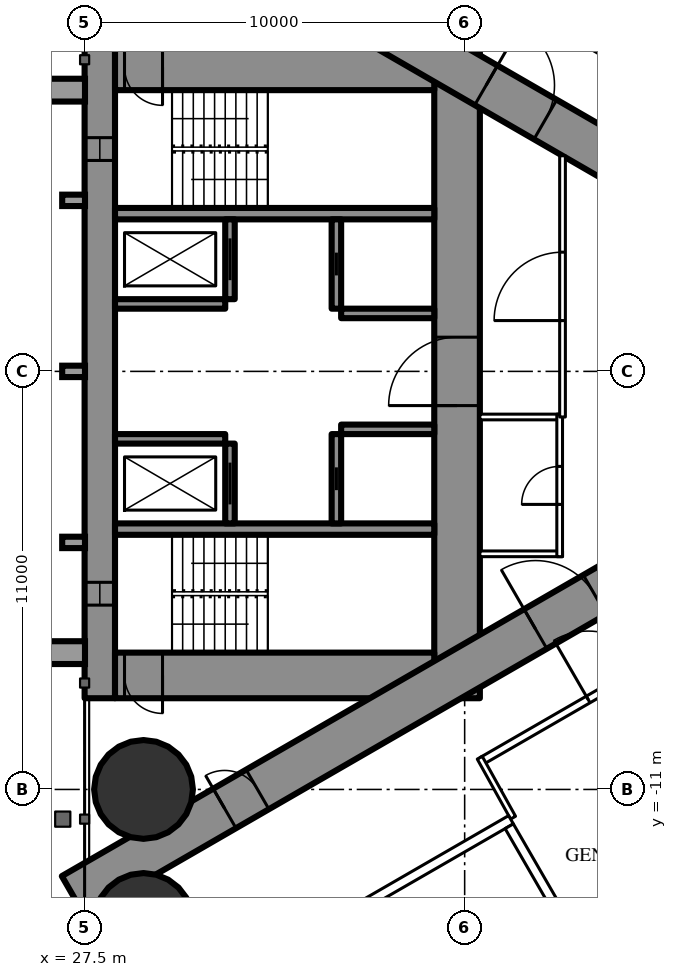
"""IFC4 building model, lengths in metres.
Left out: names, types, materials, properties, quantities, classifications, styles, units other than length and angle.
Written with IfcOpenShell. Run it as: python <this file> out.ifc"""

import sys

from ifc_helpers import new_model, si_unit, direction, frame, frame_2d, origin, origin_2d, place, context, subcontext, project, spatial, rectangle, hollow_circle, extrude, element, fill, save


model = new_model("IFC4")
c1 = context("Model", 3, precision=1e-05, world=origin(), true_north=direction((0.0, 1.0)))
c2 = subcontext(c1, "Body", "Model", "MODEL_VIEW")
j1 = project(units=[si_unit("LENGTHUNIT", "METRE"), si_unit("PLANEANGLEUNIT", "RADIAN")], contexts=[c1])
p1 = place(None, origin())
s1 = spatial("IfcSite", under=j1, at=p1, CompositionType="ELEMENT")
p2 = place(p1, origin())
s2 = spatial("IfcBuilding", under=s1, at=p2, CompositionType="ELEMENT")
p3 = place(p2, frame((0.0, 0.0, 143.1)))
s3 = spatial("IfcBuildingStorey", under=s2, at=p3, CompositionType="ELEMENT", Elevation=143.1)
for number, where, z_axis, x_axis in (
    (1, (29.05, -11.0, 0.0), (0.0, 0.0, 1.0), (1.0, 0.0, 0.0)),
    (2, (29.05, -14.5, 0.0), (0.0, 0.0, 1.0), (1.0, 0.0, 0.0)),
):
    element("IfcColumn", number, at=place(p3, frame(where, z_axis=z_axis, x_axis=x_axis)), inside=s3, PredefinedType="COLUMN", context=c2, shape_type="SweptSolid", body=[
        extrude(hollow_circle(Radius=1.3, WallThickness=0.1, at=origin_2d()), origin(), (0.0, 0.0, 1.0), 3.6),
    ])
p4 = place(p3, frame((27.9, -8.6, 0.0), z_axis=(0.0, 0.0, 1.0), x_axis=(0.0, 1.0, 0.0)))
e3 = element("IfcWall", 3, at=p4, inside=s3, PredefinedType="SHEAR", context=c2, shape_type="SweptSolid", body=[
    extrude(rectangle(XDim=17.2, YDim=0.8, at=frame_2d((8.6, 0.0))), origin(), (0.0, 0.0, 1.0), 3.6),
])
p5 = place(p4, frame((2.45, 0.0, 0.6)))
e4 = element("IfcOpeningElement", 4, at=p5, cuts=e3, PredefinedType="OPENING", context=c2, shape_type="SweptSolid", body=[
    extrude(rectangle(XDim=0.6, YDim=2.1, at=frame_2d((0.3, 1.05))), frame((0.0, 0.41, 0.0), z_axis=(0.0, -1.0, 0.0), x_axis=(1.0, 0.0, 0.0)), (0.0, 0.0, 1.0), 0.82),
])
p6 = place(p4, frame((14.15, 0.0, 0.6)))
e5 = element("IfcOpeningElement", 5, at=p6, cuts=e3, PredefinedType="OPENING", context=c2, shape_type="SweptSolid", body=[
    extrude(rectangle(XDim=0.6, YDim=2.1, at=frame_2d((0.3, 1.05))), frame((0.0, 0.41, 0.0), z_axis=(0.0, -1.0, 0.0), x_axis=(1.0, 0.0, 0.0)), (0.0, 0.0, 1.0), 0.82),
])
p7 = place(p3, frame((37.3, -8.6, 0.0), z_axis=(0.0, 0.0, 1.0), x_axis=(0.0, 1.0, 0.0)))
e6 = element("IfcWall", 6, at=p7, inside=s3, PredefinedType="SHEAR", context=c2, shape_type="SweptSolid", body=[
    extrude(rectangle(XDim=17.2, YDim=1.2, at=frame_2d((8.6, 0.0))), origin(), (0.0, 0.0, 1.0), 3.6),
])
p8 = place(p7, frame((7.7, 0.0, 0.0)))
e7 = element("IfcOpeningElement", 7, at=p8, cuts=e6, PredefinedType="OPENING", context=c2, shape_type="SweptSolid", body=[
    extrude(rectangle(XDim=1.8, YDim=2.2, at=frame_2d((0.9, 1.1))), frame((0.0, 0.61, 0.0), z_axis=(0.0, -1.0, 0.0), x_axis=(1.0, 0.0, 0.0)), (0.0, 0.0, 1.0), 1.22),
])
p9 = place(p3, frame((28.3, -8.0, 0.0), z_axis=(0.0, 0.0, 1.0), x_axis=(1.0, 0.0, 0.0)))
e8 = element("IfcWall", 8, at=p9, inside=s3, PredefinedType="SHEAR", context=c2, shape_type="SweptSolid", body=[
    extrude(rectangle(XDim=8.4, YDim=1.2, at=frame_2d((4.2, 0.0))), origin(), (0.0, 0.0, 1.0), 3.6),
])
p10 = place(p9, frame((0.25, 0.0, 0.0)))
e9 = element("IfcOpeningElement", 9, at=p10, cuts=e8, PredefinedType="OPENING", context=c2, shape_type="SweptSolid", body=[
    extrude(rectangle(XDim=1.0, YDim=2.2, at=frame_2d((0.5, 1.1))), frame((0.0, 0.61, 0.0), z_axis=(0.0, -1.0, 0.0), x_axis=(1.0, 0.0, 0.0)), (0.0, 0.0, 1.0), 1.22),
])
p11 = place(p3, frame((28.3, 8.0, 0.0), z_axis=(0.0, 0.0, 1.0), x_axis=(1.0, 0.0, 0.0)))
e10 = element("IfcWall", 10, at=p11, inside=s3, PredefinedType="SHEAR", context=c2, shape_type="SweptSolid", body=[
    extrude(rectangle(XDim=8.4, YDim=1.2, at=frame_2d((4.2, 0.0))), origin(), (0.0, 0.0, 1.0), 3.6),
])
p12 = place(p11, frame((0.25, 0.0, 0.0)))
e11 = element("IfcOpeningElement", 11, at=p12, cuts=e10, PredefinedType="OPENING", context=c2, shape_type="SweptSolid", body=[
    extrude(rectangle(XDim=1.0, YDim=2.2, at=frame_2d((0.5, 1.1))), frame((0.0, 0.61, 0.0), z_axis=(0.0, -1.0, 0.0), x_axis=(1.0, 0.0, 0.0)), (0.0, 0.0, 1.0), 1.22),
])
for number, where, z_axis, x_axis in (
    (12, (28.3, -4.15, 0.0), (0.0, 0.0, 1.0), (1.0, 0.0, 0.0)),
    (13, (28.3, 4.15, 0.0), (0.0, 0.0, 1.0), (1.0, 0.0, 0.0)),
):
    element("IfcWall", number, at=place(p3, frame(where, z_axis=z_axis, x_axis=x_axis)), inside=s3, PredefinedType="SHEAR", context=c2, shape_type="SweptSolid", body=[
        extrude(rectangle(XDim=8.4, YDim=0.3, at=frame_2d((4.2, 0.0))), origin(), (0.0, 0.0, 1.0), 3.6),
    ])
p13 = place(p3, frame((31.325, -4.0, 0.0), z_axis=(0.0, 0.0, 1.0), x_axis=(0.0, 1.0, 0.0)))
e14 = element("IfcWall", 14, at=p13, inside=s3, PredefinedType="SHEAR", context=c2, shape_type="SweptSolid", body=[
    extrude(rectangle(XDim=2.1, YDim=0.25, at=frame_2d((1.05, 0.0))), origin(), (0.0, 0.0, 1.0), 3.6),
])
p14 = place(p13, frame((0.5, 0.0, 0.0)))
e15 = element("IfcOpeningElement", 15, at=p14, cuts=e14, PredefinedType="OPENING", context=c2, shape_type="SweptSolid", body=[
    extrude(rectangle(XDim=1.1, YDim=2.2, at=frame_2d((0.55, 1.1))), frame((0.0, 0.135, 0.0), z_axis=(0.0, -1.0, 0.0), x_axis=(1.0, 0.0, 0.0)), (0.0, 0.0, 1.0), 0.27),
])
p15 = place(p3, frame((34.125, -4.0, 0.0), z_axis=(0.0, 0.0, 1.0), x_axis=(0.0, 1.0, 0.0)))
e16 = element("IfcWall", 16, at=p15, inside=s3, PredefinedType="SHEAR", context=c2, shape_type="SweptSolid", body=[
    extrude(rectangle(XDim=2.35, YDim=0.25, at=frame_2d((1.175, 0.0))), origin(), (0.0, 0.0, 1.0), 3.6),
])
p16 = place(p15, frame((0.875, 0.0, 0.0)))
e17 = element("IfcOpeningElement", 17, at=p16, cuts=e16, PredefinedType="OPENING", context=c2, shape_type="SweptSolid", body=[
    extrude(rectangle(XDim=0.6, YDim=2.0, at=frame_2d((0.3, 1.0))), frame((0.0, 0.135, 0.0), z_axis=(0.0, -1.0, 0.0), x_axis=(1.0, 0.0, 0.0)), (0.0, 0.0, 1.0), 0.27),
])
p17 = place(p3, frame((28.3, -1.775, 0.0), z_axis=(0.0, 0.0, 1.0), x_axis=(1.0, 0.0, 0.0)))
e18 = element("IfcWall", 18, at=p17, inside=s3, PredefinedType="SHEAR", context=c2, shape_type="SweptSolid", body=[
    extrude(rectangle(XDim=2.9, YDim=0.25, at=frame_2d((1.45, 0.0))), origin(), (0.0, 0.0, 1.0), 3.6),
])
p18 = place(p3, frame((34.25, -1.525, 0.0), z_axis=(0.0, 0.0, 1.0), x_axis=(1.0, 0.0, 0.0)))
e19 = element("IfcWall", 19, at=p18, inside=s3, PredefinedType="SHEAR", context=c2, shape_type="SweptSolid", body=[
    extrude(rectangle(XDim=2.45, YDim=0.25, at=frame_2d((1.225, 0.0))), origin(), (0.0, 0.0, 1.0), 3.6),
])
p19 = place(p3, frame((31.325, 1.9, 0.0), z_axis=(0.0, 0.0, 1.0), x_axis=(0.0, 1.0, 0.0)))
e20 = element("IfcWall", 20, at=p19, inside=s3, PredefinedType="SHEAR", context=c2, shape_type="SweptSolid", body=[
    extrude(rectangle(XDim=2.1, YDim=0.25, at=frame_2d((1.05, 0.0))), origin(), (0.0, 0.0, 1.0), 3.6),
])
p20 = place(p19, frame((0.5, 0.0, 0.0)))
e21 = element("IfcOpeningElement", 21, at=p20, cuts=e20, PredefinedType="OPENING", context=c2, shape_type="SweptSolid", body=[
    extrude(rectangle(XDim=1.1, YDim=2.2, at=frame_2d((0.55, 1.1))), frame((0.0, 0.135, 0.0), z_axis=(0.0, -1.0, 0.0), x_axis=(1.0, 0.0, 0.0)), (0.0, 0.0, 1.0), 0.27),
])
p21 = place(p3, frame((34.125, 1.65, 0.0), z_axis=(0.0, 0.0, 1.0), x_axis=(0.0, 1.0, 0.0)))
e22 = element("IfcWall", 22, at=p21, inside=s3, PredefinedType="SHEAR", context=c2, shape_type="SweptSolid", body=[
    extrude(rectangle(XDim=2.35, YDim=0.25, at=frame_2d((1.175, 0.0))), origin(), (0.0, 0.0, 1.0), 3.6),
])
p22 = place(p21, frame((0.875, 0.0, 0.0)))
e23 = element("IfcOpeningElement", 23, at=p22, cuts=e22, PredefinedType="OPENING", context=c2, shape_type="SweptSolid", body=[
    extrude(rectangle(XDim=0.6, YDim=2.0, at=frame_2d((0.3, 1.0))), frame((0.0, 0.135, 0.0), z_axis=(0.0, -1.0, 0.0), x_axis=(1.0, 0.0, 0.0)), (0.0, 0.0, 1.0), 0.27),
])
p23 = place(p3, frame((28.3, 1.775, 0.0), z_axis=(0.0, 0.0, 1.0), x_axis=(1.0, 0.0, 0.0)))
e24 = element("IfcWall", 24, at=p23, inside=s3, PredefinedType="SHEAR", context=c2, shape_type="SweptSolid", body=[
    extrude(rectangle(XDim=2.9, YDim=0.25, at=frame_2d((1.45, 0.0))), origin(), (0.0, 0.0, 1.0), 3.6),
])
p24 = place(p3, frame((34.25, 1.525, 0.0), z_axis=(0.0, 0.0, 1.0), x_axis=(1.0, 0.0, 0.0)))
e25 = element("IfcWall", 25, at=p24, inside=s3, PredefinedType="SHEAR", context=c2, shape_type="SweptSolid", body=[
    extrude(rectangle(XDim=2.45, YDim=0.25, at=frame_2d((1.225, 0.0))), origin(), (0.0, 0.0, 1.0), 3.6),
])
p25 = place(p3, frame((27.2, -13.8, 0.0), z_axis=(0.0, 0.0, 1.0), x_axis=(0.866027159892, 0.499996958321, 0.0)))
e26 = element("IfcWall", 26, at=p25, inside=s3, PredefinedType="SHEAR", context=c2, shape_type="SweptSolid", body=[
    extrude(rectangle(XDim=27.947, YDim=1.2, at=frame_2d((13.973, 0.0))), origin(), (0.0, 0.0, 1.0), 3.6),
])
p26 = place(p25, frame((4.6, 0.0, 0.0)))
e27 = element("IfcOpeningElement", 27, at=p26, cuts=e26, PredefinedType="OPENING", context=c2, shape_type="SweptSolid", body=[
    extrude(rectangle(XDim=1.0, YDim=2.2, at=frame_2d((0.5, 1.1))), frame((0.0, 0.61, 0.0), z_axis=(0.0, -1.0, 0.0), x_axis=(1.0, 0.0, 0.0)), (0.0, 0.0, 1.0), 1.22),
])
p27 = place(p25, frame((14.045, 0.0, 0.0)))
e28 = element("IfcOpeningElement", 28, at=p27, cuts=e26, PredefinedType="OPENING", context=c2, shape_type="SweptSolid", body=[
    extrude(rectangle(XDim=1.8, YDim=2.2, at=frame_2d((0.9, 1.1))), frame((0.0, 0.61, 0.0), z_axis=(0.0, -1.0, 0.0), x_axis=(1.0, 0.0, 0.0)), (0.0, 0.0, 1.0), 1.22),
])
p28 = place(p3, frame((27.2, 13.8, 0.0), z_axis=(0.0, 0.0, 1.0), x_axis=(0.866024515034, -0.500001539357, 0.0)))
e29 = element("IfcWall", 29, at=p28, inside=s3, PredefinedType="SHEAR", context=c2, shape_type="SweptSolid", body=[
    extrude(rectangle(XDim=26.907, YDim=1.2, at=frame_2d((13.454, 0.0))), origin(), (0.0, 0.0, 1.0), 3.6),
])
p29 = place(p28, frame((4.5, 0.0, 0.0)))
e30 = element("IfcOpeningElement", 30, at=p29, cuts=e29, PredefinedType="OPENING", context=c2, shape_type="SweptSolid", body=[
    extrude(rectangle(XDim=1.0, YDim=2.2, at=frame_2d((0.5, 1.1))), frame((0.0, 0.61, 0.0), z_axis=(0.0, -1.0, 0.0), x_axis=(1.0, 0.0, 0.0)), (0.0, 0.0, 1.0), 1.22),
])
p30 = place(p28, frame((12.545, 0.0, 0.0)))
e31 = element("IfcOpeningElement", 31, at=p30, cuts=e29, PredefinedType="OPENING", context=c2, shape_type="SweptSolid", body=[
    extrude(rectangle(XDim=1.8, YDim=2.2, at=frame_2d((0.9, 1.1))), frame((0.0, 0.61, 0.0), z_axis=(0.0, -1.0, 0.0), x_axis=(1.0, 0.0, 0.0)), (0.0, 0.0, 1.0), 1.22),
])
p31 = place(p3, frame((37.96, -10.243, 0.0), z_axis=(0.0, 0.0, 1.0), x_axis=(0.866026429433, 0.499998223521, 0.0)))
e32 = element("IfcWall", 32, at=p31, inside=s3, PredefinedType="PARTITIONING", context=c2, shape_type="SweptSolid", body=[
    extrude(rectangle(XDim=20.487, YDim=0.2, at=frame_2d((10.243, 0.0))), origin(), (0.0, 0.0, 1.0), 3.35),
])
p32 = place(p31, frame((11.464, 0.0, 0.0)))
e33 = element("IfcOpeningElement", 33, at=p32, cuts=e32, PredefinedType="OPENING", context=c2, shape_type="SweptSolid", body=[
    extrude(rectangle(XDim=1.8, YDim=2.2, at=frame_2d((0.9, 1.1))), frame((0.0, 0.11, 0.0), z_axis=(0.0, -1.0, 0.0), x_axis=(1.0, 0.0, 0.0)), (0.0, 0.0, 1.0), 0.22),
])
p33 = place(p31, frame((17.586, 0.0, 0.0)))
e34 = element("IfcOpeningElement", 34, at=p33, cuts=e32, PredefinedType="OPENING", context=c2, shape_type="SweptSolid", body=[
    extrude(rectangle(XDim=1.8, YDim=2.14, at=frame_2d((0.9, 1.07))), frame((0.0, 0.11, 0.0), z_axis=(0.0, -1.0, 0.0), x_axis=(1.0, 0.0, 0.0)), (0.0, 0.0, 1.0), 0.22),
])
p34 = place(p31, frame((3.221, 0.0, 0.0)))
e35 = element("IfcOpeningElement", 35, at=p34, cuts=e32, PredefinedType="OPENING", context=c2, shape_type="SweptSolid", body=[
    extrude(rectangle(XDim=1.8, YDim=2.2, at=frame_2d((0.9, 1.1))), frame((0.0, 0.11, 0.0), z_axis=(0.0, -1.0, 0.0), x_axis=(1.0, 0.0, 0.0)), (0.0, 0.0, 1.0), 0.22),
])
p35 = place(p3, frame((36.834, 10.894, 0.0), z_axis=(0.0, 0.0, 1.0), x_axis=(0.866028157229, -0.499995230863, 0.0)))
e36 = element("IfcWall", 36, at=p35, inside=s3, PredefinedType="PARTITIONING", context=c2, shape_type="SweptSolid", body=[
    extrude(rectangle(XDim=21.667, YDim=0.2, at=frame_2d((10.833, 0.0))), origin(), (0.0, 0.0, 1.0), 3.35),
])
p36 = place(p35, frame((18.826, 0.0, 0.0)))
e37 = element("IfcOpeningElement", 37, at=p36, cuts=e36, PredefinedType="OPENING", context=c2, shape_type="SweptSolid", body=[
    extrude(rectangle(XDim=1.8, YDim=2.2, at=frame_2d((0.9, 1.1))), frame((0.0, 0.11, 0.0), z_axis=(0.0, -1.0, 0.0), x_axis=(1.0, 0.0, 0.0)), (0.0, 0.0, 1.0), 0.22),
])
p37 = place(p35, frame((14.938, 0.0, 0.0)))
e38 = element("IfcOpeningElement", 38, at=p37, cuts=e36, PredefinedType="OPENING", context=c2, shape_type="SweptSolid", body=[
    extrude(rectangle(XDim=1.8, YDim=2.2, at=frame_2d((0.9, 1.1))), frame((0.0, 0.11, 0.0), z_axis=(0.0, -1.0, 0.0), x_axis=(1.0, 0.0, 0.0)), (0.0, 0.0, 1.0), 0.22),
])
p38 = place(p35, frame((6.248, 0.0, 0.0)))
e39 = element("IfcOpeningElement", 39, at=p38, cuts=e36, PredefinedType="OPENING", context=c2, shape_type="SweptSolid", body=[
    extrude(rectangle(XDim=1.8, YDim=2.2, at=frame_2d((0.9, 1.1))), frame((0.0, 0.11, 0.0), z_axis=(0.0, -1.0, 0.0), x_axis=(1.0, 0.0, 0.0)), (0.0, 0.0, 1.0), 0.22),
])
p39 = place(p3, frame((38.773, -11.742, 0.0), z_axis=(0.0, 0.0, 1.0), x_axis=(-0.485528096672, 0.8742210632, 0.0)))
e40 = element("IfcWall", 40, at=p39, inside=s3, PredefinedType="PARTITIONING", context=c2, shape_type="SweptSolid", body=[
    extrude(rectangle(XDim=1.805, YDim=0.15, at=frame_2d((0.903, 0.0))), origin(), (0.0, 0.0, 1.0), 3.35),
])
for number, where, z_axis, x_axis in (
    (41, (37.9, -1.2, 0.0), (0.0, 0.0, 1.0), (1.0, 0.0, 0.0)),
    (42, (37.9, -4.8, 0.0), (0.0, 0.0, 1.0), (1.0, 0.0, 0.0)),
):
    element("IfcWall", number, at=place(p3, frame(where, z_axis=z_axis, x_axis=x_axis)), inside=s3, PredefinedType="PARTITIONING", context=c2, shape_type="SweptSolid", body=[
        extrude(rectangle(XDim=2.175, YDim=0.15, at=frame_2d((1.087, 0.0))), origin(), (0.0, 0.0, 1.0), 3.35),
    ])
p40 = place(p3, frame((40.0, -4.875, 0.0), z_axis=(0.0, 0.0, 1.0), x_axis=(0.0, 1.0, 0.0)))
e43 = element("IfcWall", 43, at=p40, inside=s3, PredefinedType="PARTITIONING", context=c2, shape_type="SweptSolid", body=[
    extrude(rectangle(XDim=3.75, YDim=0.15, at=frame_2d((1.875, 0.0))), origin(), (0.0, 0.0, 1.0), 3.35),
])
p41 = place(p40, frame((1.375, 0.0, 0.0)))
e44 = element("IfcOpeningElement", 44, at=p41, cuts=e43, PredefinedType="OPENING", context=c2, shape_type="SweptSolid", body=[
    extrude(rectangle(XDim=1.0, YDim=2.2, at=frame_2d((0.5, 1.1))), frame((0.0, 0.085, 0.0), z_axis=(0.0, -1.0, 0.0), x_axis=(1.0, 0.0, 0.0)), (0.0, 0.0, 1.0), 0.17),
])
p42 = place(p3, frame((40.075, -1.2, 0.0), z_axis=(0.0, 0.0, 1.0), x_axis=(0.0, 1.0, 0.0)))
e45 = element("IfcWall", 45, at=p42, inside=s3, PredefinedType="PARTITIONING", context=c2, shape_type="SweptSolid", body=[
    extrude(rectangle(XDim=6.874, YDim=0.15, at=frame_2d((3.437, 0.0))), origin(), (0.0, 0.0, 1.0), 3.35),
])
p43 = place(p42, frame((2.537, 0.0, 0.0)))
e46 = element("IfcOpeningElement", 46, at=p43, cuts=e45, PredefinedType="OPENING", context=c2, shape_type="SweptSolid", body=[
    extrude(rectangle(XDim=1.8, YDim=2.2, at=frame_2d((0.9, 1.1))), frame((0.0, 0.085, 0.0), z_axis=(0.0, -1.0, 0.0), x_axis=(1.0, 0.0, 0.0)), (0.0, 0.0, 1.0), 0.17),
])
p44 = place(p3, frame((31.271, -16.097, 0.0), z_axis=(0.0, 0.0, 1.0), x_axis=(0.86604045752, 0.499973925258, 0.0)))
e47 = element("IfcWall", 47, at=p44, inside=s3, PredefinedType="PARTITIONING", context=c2, shape_type="SweptSolid", body=[
    extrude(rectangle(XDim=8.6, YDim=0.25, at=frame_2d((4.3, 0.0))), origin(), (0.0, 0.0, 1.0), 3.35),
])
p45 = place(p3, frame((38.673, -11.968, 0.0), z_axis=(0.0, 0.0, 1.0), x_axis=(0.499929347863, -0.866066190972, 0.0)))
e48 = element("IfcWall", 48, at=p45, inside=s3, PredefinedType="PARTITIONING", context=c2, shape_type="SweptSolid", body=[
    extrude(rectangle(XDim=3.201, YDim=0.25, at=frame_2d((1.6, 0.0))), origin(), (0.0, 0.0, 1.0), 3.35),
])
p46 = place(p34, origin())
e49 = element("IfcDoor", 49, at=p46, inside=s3, OperationType="DOUBLE_DOOR_SINGLE_SWING", PredefinedType="DOOR", context=c2, shape_type="SweptSolid", body=[
    extrude(rectangle(XDim=1.8, YDim=2.2, at=frame_2d((0.9, 1.1))), frame((0.0, 0.025, 0.0), z_axis=(0.0, -1.0, 0.0), x_axis=(1.0, 0.0, 0.0)), (0.0, 0.0, 1.0), 0.05),
])
fill(e35, e49)
p47 = place(p41, origin())
e50 = element("IfcDoor", 50, at=p47, inside=s3, OperationType="SINGLE_SWING_LEFT", PredefinedType="DOOR", context=c2, shape_type="SweptSolid", body=[
    extrude(rectangle(XDim=1.0, YDim=2.2, at=frame_2d((0.5, 1.1))), frame((0.0, 0.025, 0.0), z_axis=(0.0, -1.0, 0.0), x_axis=(1.0, 0.0, 0.0)), (0.0, 0.0, 1.0), 0.05),
])
fill(e44, e50)
p48 = place(p43, origin())
e51 = element("IfcDoor", 51, at=p48, inside=s3, OperationType="DOUBLE_DOOR_SINGLE_SWING", PredefinedType="DOOR", context=c2, shape_type="SweptSolid", body=[
    extrude(rectangle(XDim=1.8, YDim=2.2, at=frame_2d((0.9, 1.1))), frame((0.0, 0.025, 0.0), z_axis=(0.0, -1.0, 0.0), x_axis=(1.0, 0.0, 0.0)), (0.0, 0.0, 1.0), 0.05),
])
fill(e46, e51)
p49 = place(p26, origin())
e52 = element("IfcDoor", 52, at=p49, inside=s3, OperationType="SINGLE_SWING_LEFT", PredefinedType="DOOR", context=c2, shape_type="SweptSolid", body=[
    extrude(rectangle(XDim=1.0, YDim=2.2, at=frame_2d((0.5, 1.1))), frame((0.0, 0.025, 0.0), z_axis=(0.0, -1.0, 0.0), x_axis=(1.0, 0.0, 0.0)), (0.0, 0.0, 1.0), 0.05),
])
fill(e27, e52)
p50 = place(p27, origin())
e53 = element("IfcDoor", 53, at=p50, inside=s3, OperationType="DOUBLE_DOOR_SINGLE_SWING", PredefinedType="DOOR", context=c2, shape_type="SweptSolid", body=[
    extrude(rectangle(XDim=1.8, YDim=2.2, at=frame_2d((0.9, 1.1))), frame((0.0, 0.025, 0.0), z_axis=(0.0, -1.0, 0.0), x_axis=(1.0, 0.0, 0.0)), (0.0, 0.0, 1.0), 0.05),
])
fill(e28, e53)
p51 = place(p30, origin())
e54 = element("IfcDoor", 54, at=p51, inside=s3, OperationType="DOUBLE_DOOR_SINGLE_SWING", PredefinedType="DOOR", context=c2, shape_type="SweptSolid", body=[
    extrude(rectangle(XDim=1.8, YDim=2.2, at=frame_2d((0.9, 1.1))), frame((0.0, 0.025, 0.0), z_axis=(0.0, -1.0, 0.0), x_axis=(1.0, 0.0, 0.0)), (0.0, 0.0, 1.0), 0.05),
])
fill(e31, e54)
p52 = place(p8, origin())
e55 = element("IfcDoor", 55, at=p52, inside=s3, OperationType="DOUBLE_DOOR_SINGLE_SWING", PredefinedType="DOOR", context=c2, shape_type="SweptSolid", body=[
    extrude(rectangle(XDim=1.8, YDim=2.2, at=frame_2d((0.9, 1.1))), frame((0.0, 0.025, 0.0), z_axis=(0.0, -1.0, 0.0), x_axis=(1.0, 0.0, 0.0)), (0.0, 0.0, 1.0), 0.05),
])
fill(e7, e55)
p53 = place(p10, origin())
e56 = element("IfcDoor", 56, at=p53, inside=s3, OperationType="SINGLE_SWING_RIGHT", PredefinedType="DOOR", context=c2, shape_type="SweptSolid", body=[
    extrude(rectangle(XDim=1.0, YDim=2.2, at=frame_2d((0.5, 1.1))), frame((0.0, 0.025, 0.0), z_axis=(0.0, -1.0, 0.0), x_axis=(1.0, 0.0, 0.0)), (0.0, 0.0, 1.0), 0.05),
])
fill(e9, e56)
p54 = place(p12, origin())
e57 = element("IfcDoor", 57, at=p54, inside=s3, OperationType="SINGLE_SWING_RIGHT", PredefinedType="DOOR", context=c2, shape_type="SweptSolid", body=[
    extrude(rectangle(XDim=1.0, YDim=2.2, at=frame_2d((0.5, 1.1))), frame((0.0, 0.025, 0.0), z_axis=(0.0, -1.0, 0.0), x_axis=(1.0, 0.0, 0.0)), (0.0, 0.0, 1.0), 0.05),
])
fill(e11, e57)
p55 = place(p14, origin())
e58 = element("IfcDoor", 58, at=p55, inside=s3, OperationType="SLIDING_TO_LEFT", PredefinedType="USERDEFINED", context=c2, shape_type="SweptSolid", body=[
    extrude(rectangle(XDim=1.1, YDim=2.2, at=frame_2d((0.55, 1.1))), frame((0.0, 0.025, 0.0), z_axis=(0.0, -1.0, 0.0), x_axis=(1.0, 0.0, 0.0)), (0.0, 0.0, 1.0), 0.05),
])
fill(e15, e58)
p56 = place(p20, origin())
e59 = element("IfcDoor", 59, at=p56, inside=s3, OperationType="SLIDING_TO_LEFT", PredefinedType="USERDEFINED", context=c2, shape_type="SweptSolid", body=[
    extrude(rectangle(XDim=1.1, YDim=2.2, at=frame_2d((0.55, 1.1))), frame((0.0, 0.025, 0.0), z_axis=(0.0, -1.0, 0.0), x_axis=(1.0, 0.0, 0.0)), (0.0, 0.0, 1.0), 0.05),
])
fill(e21, e59)
p57 = place(p16, origin())
e60 = element("IfcDoor", 60, at=p57, inside=s3, OperationType="SLIDING_TO_LEFT", PredefinedType="DOOR", context=c2, shape_type="SweptSolid", body=[
    extrude(rectangle(XDim=0.6, YDim=2.0, at=frame_2d((0.3, 1.0))), frame((0.0, 0.025, 0.0), z_axis=(0.0, -1.0, 0.0), x_axis=(1.0, 0.0, 0.0)), (0.0, 0.0, 1.0), 0.05),
])
fill(e17, e60)
p58 = place(p22, origin())
e61 = element("IfcDoor", 61, at=p58, inside=s3, OperationType="SLIDING_TO_LEFT", PredefinedType="DOOR", context=c2, shape_type="SweptSolid", body=[
    extrude(rectangle(XDim=0.6, YDim=2.0, at=frame_2d((0.3, 1.0))), frame((0.0, 0.025, 0.0), z_axis=(0.0, -1.0, 0.0), x_axis=(1.0, 0.0, 0.0)), (0.0, 0.0, 1.0), 0.05),
])
fill(e23, e61)
p59 = place(p5, origin())
e62 = element("IfcWindow", 62, at=p59, inside=s3, PartitioningType="SINGLE_PANEL", PredefinedType="WINDOW", context=c2, shape_type="SweptSolid", body=[
    extrude(rectangle(XDim=0.6, YDim=2.1, at=frame_2d((0.3, 1.05))), frame((0.0, 0.03, 0.0), z_axis=(0.0, -1.0, 0.0), x_axis=(1.0, 0.0, 0.0)), (0.0, 0.0, 1.0), 0.06),
])
fill(e4, e62)
p60 = place(p6, origin())
e63 = element("IfcWindow", 63, at=p60, inside=s3, PartitioningType="SINGLE_PANEL", PredefinedType="WINDOW", context=c2, shape_type="SweptSolid", body=[
    extrude(rectangle(XDim=0.6, YDim=2.1, at=frame_2d((0.3, 1.05))), frame((0.0, 0.03, 0.0), z_axis=(0.0, -1.0, 0.0), x_axis=(1.0, 0.0, 0.0)), (0.0, 0.0, 1.0), 0.06),
])
fill(e5, e63)
save(model, sys.argv[1])
